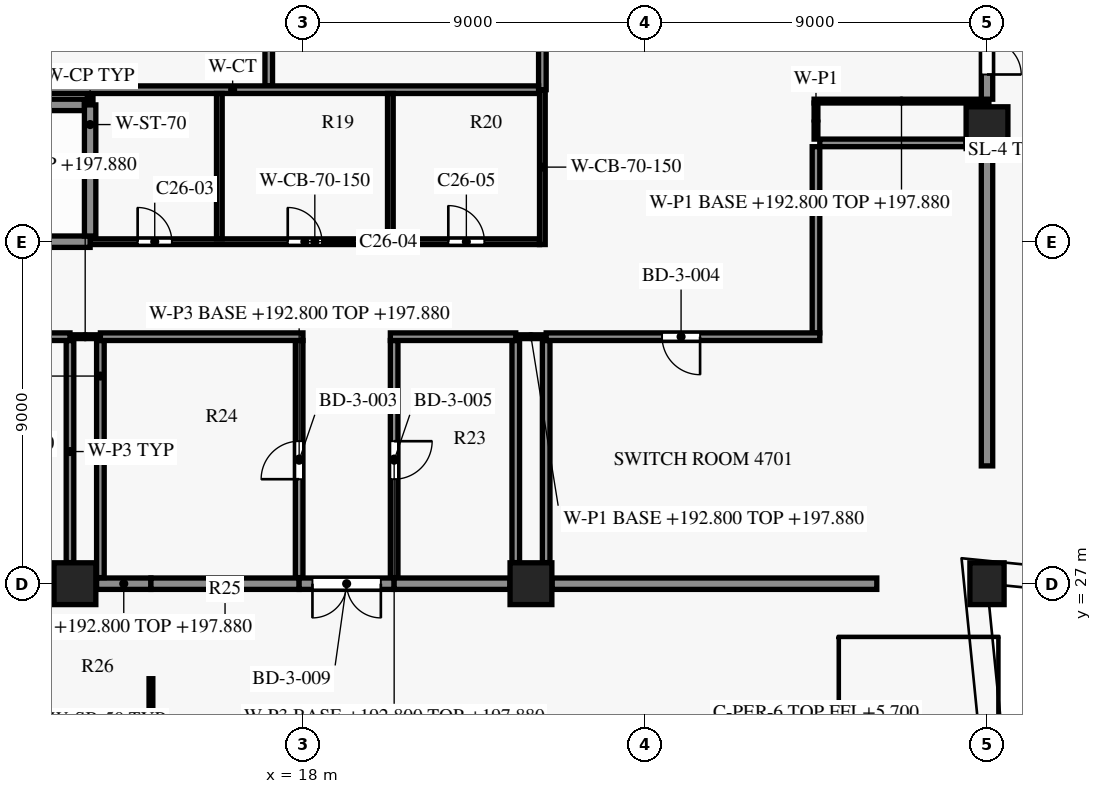
"""IFC4 building model, lengths in metres.
Left out: names, types, materials, properties, quantities, classifications, styles, units other than length and angle.
Written with IfcOpenShell. Run it as: python <this file> out.ifc"""

import sys

from ifc_helpers import new_model, si_unit, direction, frame, frame_2d, origin, origin_2d, place, context, subcontext, project, spatial, rectangle, extrude, element, fill, save


model = new_model("IFC4")
c1 = context("Model", 3, precision=1e-05, world=origin(), true_north=direction((0.0, 1.0)))
c2 = subcontext(c1, "Body", "Model", "MODEL_VIEW")
j1 = project(units=[si_unit("LENGTHUNIT", "METRE"), si_unit("PLANEANGLEUNIT", "RADIAN")], contexts=[c1])
p1 = place(None, origin())
s1 = spatial("IfcSite", under=j1, at=p1, CompositionType="ELEMENT")
p2 = place(p1, origin())
s2 = spatial("IfcBuilding", under=s1, at=p2, CompositionType="ELEMENT")
p3 = place(p2, frame((0.0, 0.0, 192.8)))
s3 = spatial("IfcBuildingStorey", under=s2, at=p3, CompositionType="ELEMENT", Elevation=192.8)
p4 = place(p3, frame((36.0, 27.0, 0.0), z_axis=(0.0, 0.0, 1.0), x_axis=(-0.0995038382, 0.995037178292, 0.0)))
e1 = element("IfcColumn", 1, at=p4, inside=s3, PredefinedType="COLUMN", context=c2, shape_type="SweptSolid", body=[
    extrude(rectangle(XDim=0.9, YDim=1.1, at=origin_2d()), origin(), (0.0, 0.0, 1.0), 6.0),
])
for number, where, z_axis, x_axis in (
    (2, (12.0, 27.0, 0.0), (0.0, 0.0, 1.0), (1.0, 0.0, 0.0)),
    (3, (24.0, 27.0, 0.0), (0.0, 0.0, 1.0), (1.0, 0.0, 0.0)),
    (4, (36.0, 39.0, 0.0), (0.0, 0.0, 1.0), (1.0, 0.0, 0.0)),
):
    element("IfcColumn", number, at=place(p3, frame(where, z_axis=z_axis, x_axis=x_axis)), inside=s3, PredefinedType="COLUMN", context=c2, shape_type="SweptSolid", body=[
        extrude(rectangle(XDim=1.1, YDim=1.1, at=origin_2d()), origin(), (0.0, 0.0, 1.0), 6.0),
    ])
p5 = place(p3, frame((12.4, 36.0, 0.0), z_axis=(0.0, 0.0, 1.0), x_axis=(1.0, 0.0, 0.0)))
e5 = element("IfcWall", 5, at=p5, inside=s3, PredefinedType="SHEAR", context=c2, shape_type="SweptSolid", body=[
    extrude(rectangle(XDim=11.825, YDim=0.15, at=frame_2d((5.913, 0.0))), origin(), (0.0, 0.0, 1.0), 5.7),
])
p6 = place(p5, frame((1.25, 0.0, 0.0)))
e6 = element("IfcOpeningElement", 6, at=p6, cuts=e5, PredefinedType="OPENING", context=c2, shape_type="SweptSolid", body=[
    extrude(rectangle(XDim=0.9, YDim=2.1, at=frame_2d((0.45, 1.05))), frame((0.0, 0.085, 0.0), z_axis=(0.0, -1.0, 0.0), x_axis=(1.0, 0.0, 0.0)), (0.0, 0.0, 1.0), 0.17),
])
p7 = place(p5, frame((5.2, 0.0, 0.0)))
e7 = element("IfcOpeningElement", 7, at=p7, cuts=e5, PredefinedType="OPENING", context=c2, shape_type="SweptSolid", body=[
    extrude(rectangle(XDim=0.9, YDim=2.1, at=frame_2d((0.45, 1.05))), frame((0.0, 0.085, 0.0), z_axis=(0.0, -1.0, 0.0), x_axis=(1.0, 0.0, 0.0)), (0.0, 0.0, 1.0), 0.17),
])
p8 = place(p5, frame((9.425, 0.0, 0.0)))
e8 = element("IfcOpeningElement", 8, at=p8, cuts=e5, PredefinedType="OPENING", context=c2, shape_type="SweptSolid", body=[
    extrude(rectangle(XDim=0.95, YDim=2.1, at=frame_2d((0.475, 1.05))), frame((0.0, 0.085, 0.0), z_axis=(0.0, -1.0, 0.0), x_axis=(1.0, 0.0, 0.0)), (0.0, 0.0, 1.0), 0.17),
])
p9 = place(p3, frame((4.55, 36.0, 0.0), z_axis=(0.0, 0.0, 1.0), x_axis=(1.0, 0.0, 0.0)))
e9 = element("IfcWall", 9, at=p9, inside=s3, PredefinedType="SHEAR", context=c2, shape_type="SweptSolid", body=[
    extrude(rectangle(XDim=7.85, YDim=0.3, at=frame_2d((3.925, 0.0))), origin(), (0.0, 0.0, 1.0), 5.7),
])
p10 = place(p9, frame((0.15, 0.0, 0.0)))
e10 = element("IfcOpeningElement", 10, at=p10, cuts=e9, PredefinedType="OPENING", context=c2, shape_type="SweptSolid", body=[
    extrude(rectangle(XDim=1.5, YDim=2.2, at=frame_2d((0.75, 1.1))), frame((0.0, 0.16, 0.0), z_axis=(0.0, -1.0, 0.0), x_axis=(1.0, 0.0, 0.0)), (0.0, 0.0, 1.0), 0.32),
])
p11 = place(p3, frame((4.55, 39.6, 0.0), z_axis=(0.0, 0.0, 1.0), x_axis=(1.0, 0.0, 0.0)))
e11 = element("IfcWall", 11, at=p11, inside=s3, PredefinedType="SHEAR", context=c2, shape_type="SweptSolid", body=[
    extrude(rectangle(XDim=7.7, YDim=0.3, at=frame_2d((3.85, 0.0))), origin(), (0.0, 0.0, 1.0), 5.7),
])
p12 = place(p3, frame((8.1, 40.0, 0.0), z_axis=(0.0, 0.0, 1.0), x_axis=(1.0, 0.0, 0.0)))
e12 = element("IfcWall", 12, at=p12, inside=s3, PredefinedType="PARTITIONING", context=c2, shape_type="SweptSolid", body=[
    extrude(rectangle(XDim=16.1, YDim=0.2, at=frame_2d((8.05, 0.0))), origin(), (0.0, 0.0, 1.0), 5.7),
])
p13 = place(p3, frame((12.4, 39.6, 0.0), z_axis=(0.0, 0.0, 1.0), x_axis=(0.0, 1.0, 0.0)))
e13 = element("IfcWall", 13, at=p13, inside=s3, PredefinedType="PARTITIONING", context=c2, shape_type="SweptSolid", body=[
    extrude(rectangle(XDim=0.3, YDim=0.15, at=frame_2d((0.15, 0.0))), origin(), (0.0, 0.0, 1.0), 5.7),
])
p14 = place(p3, frame((12.4, 36.15, 0.0), z_axis=(0.0, 0.0, 1.0), x_axis=(0.0, 1.0, 0.0)))
e14 = element("IfcWall", 14, at=p14, inside=s3, PredefinedType="SHEAR", context=c2, shape_type="SweptSolid", body=[
    extrude(rectangle(XDim=3.45, YDim=0.3, at=frame_2d((1.725, 0.0))), origin(), (0.0, 0.0, 1.0), 5.7),
])
p15 = place(p3, frame((15.8, 36.075, 0.0), z_axis=(0.0, 0.0, 1.0), x_axis=(0.0, 1.0, 0.0)))
e15 = element("IfcWall", 15, at=p15, inside=s3, PredefinedType="PARTITIONING", context=c2, shape_type="SweptSolid", body=[
    extrude(rectangle(XDim=3.825, YDim=0.15, at=frame_2d((1.913, 0.0))), origin(), (0.0, 0.0, 1.0), 5.7),
])
p16 = place(p3, frame((17.1, 40.1, 0.0), z_axis=(0.0, 0.0, 1.0), x_axis=(0.0, 1.0, 0.0)))
e16 = element("IfcWall", 16, at=p16, inside=s3, PredefinedType="PARTITIONING", context=c2, shape_type="SweptSolid", body=[
    extrude(rectangle(XDim=3.0, YDim=0.2, at=frame_2d((1.5, 0.0))), origin(), (0.0, 0.0, 1.0), 5.7),
])
p17 = place(p3, frame((20.3, 36.075, 0.0), z_axis=(0.0, 0.0, 1.0), x_axis=(0.0, 1.0, 0.0)))
e17 = element("IfcWall", 17, at=p17, inside=s3, PredefinedType="PARTITIONING", context=c2, shape_type="SweptSolid", body=[
    extrude(rectangle(XDim=3.825, YDim=0.15, at=frame_2d((1.913, 0.0))), origin(), (0.0, 0.0, 1.0), 5.7),
])
p18 = place(p3, frame((24.3, 35.925, 0.0), z_axis=(0.0, 0.0, 1.0), x_axis=(0.0, 1.0, 0.0)))
e18 = element("IfcWall", 18, at=p18, inside=s3, PredefinedType="SHEAR", context=c2, shape_type="SweptSolid", body=[
    extrude(rectangle(XDim=4.075, YDim=0.15, at=frame_2d((2.038, 0.0))), origin(), (0.0, 0.0, 1.0), 5.7),
])
p19 = place(p3, frame((24.3, 40.0, 0.0), z_axis=(0.0, 0.0, 1.0), x_axis=(0.0, 1.0, 0.0)))
e19 = element("IfcWall", 19, at=p19, inside=s3, PredefinedType="PARTITIONING", context=c2, shape_type="SweptSolid", body=[
    extrude(rectangle(XDim=3.3, YDim=0.2, at=frame_2d((1.65, 0.0))), origin(), (0.0, 0.0, 1.0), 5.7),
])
p20 = place(p3, frame((14.0, 24.5, 0.0), z_axis=(0.0, 0.0, 1.0), x_axis=(0.0, -1.0, 0.0)))
e20 = element("IfcWall", 20, at=p20, inside=s3, PredefinedType="PARTITIONING", context=c2, shape_type="SweptSolid", body=[
    extrude(rectangle(XDim=6.3, YDim=0.1, at=frame_2d((3.15, 0.0))), origin(), (0.0, 0.0, 1.0), 5.68),
])
p21 = place(p3, frame((10.9, 27.0, 0.0), z_axis=(0.0, 0.0, 1.0), x_axis=(1.0, 0.0, 0.0)))
e21 = element("IfcWall", 21, at=p21, inside=s3, PredefinedType="PARTITIONING", context=c2, shape_type="SweptSolid", body=[
    extrude(rectangle(XDim=0.545, YDim=0.3, at=frame_2d((0.272, 0.0))), origin(), (0.0, 0.0, 1.0), 5.68),
])
p22 = place(p3, frame((12.57, 27.0, 0.0), z_axis=(0.0, 0.0, 1.0), x_axis=(1.0, 0.0, 0.0)))
e22 = element("IfcWall", 22, at=p22, inside=s3, PredefinedType="PARTITIONING", context=c2, shape_type="SweptSolid", body=[
    extrude(rectangle(XDim=1.43, YDim=0.3, at=frame_2d((0.715, 0.0))), origin(), (0.0, 0.0, 1.0), 5.08),
])
p23 = place(p3, frame((17.9, 27.0, 0.0), z_axis=(0.0, 0.0, 1.0), x_axis=(-1.0, 0.0, 0.0)))
e23 = element("IfcWall", 23, at=p23, inside=s3, PredefinedType="PARTITIONING", context=c2, shape_type="SweptSolid", body=[
    extrude(rectangle(XDim=3.9, YDim=0.3, at=frame_2d((1.95, 0.0))), origin(), (0.0, 0.0, 1.0), 5.08),
])
p24 = place(p3, frame((20.4, 27.0, 0.0), z_axis=(0.0, 0.0, 1.0), x_axis=(-1.0, 0.0, 0.0)))
e24 = element("IfcWall", 24, at=p24, inside=s3, PredefinedType="PARTITIONING", context=c2, shape_type="SweptSolid", body=[
    extrude(rectangle(XDim=2.5, YDim=0.3, at=frame_2d((1.25, 0.0))), origin(), (0.0, 0.0, 1.0), 5.08),
])
p25 = place(p24, frame((0.35, 0.0, 0.0)))
e25 = element("IfcOpeningElement", 25, at=p25, cuts=e24, PredefinedType="OPENING", context=c2, shape_type="SweptSolid", body=[
    extrude(rectangle(XDim=1.8, YDim=2.1, at=frame_2d((0.9, 1.05))), frame((0.0, 0.16, 0.0), z_axis=(0.0, -1.0, 0.0), x_axis=(1.0, 0.0, 0.0)), (0.0, 0.0, 1.0), 0.32),
])
p26 = place(p3, frame((23.445, 27.0, 0.0), z_axis=(0.0, 0.0, 1.0), x_axis=(-1.0, 0.0, 0.0)))
e26 = element("IfcWall", 26, at=p26, inside=s3, PredefinedType="PARTITIONING", context=c2, shape_type="SweptSolid", body=[
    extrude(rectangle(XDim=3.045, YDim=0.3, at=frame_2d((1.522, 0.0))), origin(), (0.0, 0.0, 1.0), 5.08),
])
p27 = place(p3, frame((33.1, 27.0, 0.0), z_axis=(0.0, 0.0, 1.0), x_axis=(-1.0, 0.0, 0.0)))
e27 = element("IfcWall", 27, at=p27, inside=s3, PredefinedType="PARTITIONING", context=c2, shape_type="SweptSolid", body=[
    extrude(rectangle(XDim=8.545, YDim=0.3, at=frame_2d((4.272, 0.0))), origin(), (0.0, 0.0, 1.0), 5.08),
])
p28 = place(p3, frame((12.67, 27.16, 0.0), z_axis=(0.0, 0.0, 1.0), x_axis=(0.0, 1.0, 0.0)))
e28 = element("IfcWall", 28, at=p28, inside=s3, PredefinedType="PARTITIONING", context=c2, shape_type="SweptSolid", body=[
    extrude(rectangle(XDim=6.24, YDim=0.2, at=frame_2d((3.12, 0.0))), origin(), (0.0, 0.0, 1.0), 5.08),
])
p29 = place(p3, frame((17.9, 27.16, 0.0), z_axis=(0.0, 0.0, 1.0), x_axis=(0.0, 1.0, 0.0)))
e29 = element("IfcWall", 29, at=p29, inside=s3, PredefinedType="PARTITIONING", context=c2, shape_type="SweptSolid", body=[
    extrude(rectangle(XDim=6.24, YDim=0.2, at=frame_2d((3.12, 0.0))), origin(), (0.0, 0.0, 1.0), 5.08),
])
p30 = place(p29, frame((2.59, 0.0, 0.0)))
e30 = element("IfcOpeningElement", 30, at=p30, cuts=e29, PredefinedType="OPENING", context=c2, shape_type="SweptSolid", body=[
    extrude(rectangle(XDim=1.0, YDim=2.1, at=frame_2d((0.5, 1.05))), frame((0.0, 0.11, 0.0), z_axis=(0.0, -1.0, 0.0), x_axis=(1.0, 0.0, 0.0)), (0.0, 0.0, 1.0), 0.22),
])
for number, where, z_axis, x_axis in (
    (31, (24.4, 27.555, 0.0), (0.0, 0.0, 1.0), (0.0, 1.0, 0.0)),
    (32, (11.87, 33.4, 0.0), (0.0, 0.0, 1.0), (0.0, -1.0, 0.0)),
):
    element("IfcWall", number, at=place(p3, frame(where, z_axis=z_axis, x_axis=x_axis)), inside=s3, PredefinedType="PARTITIONING", context=c2, shape_type="SweptSolid", body=[
        extrude(rectangle(XDim=5.845, YDim=0.2, at=frame_2d((2.922, 0.0))), origin(), (0.0, 0.0, 1.0), 5.68),
    ])
p31 = place(p3, frame((20.4, 33.4, 0.0), z_axis=(0.0, 0.0, 1.0), x_axis=(0.0, -1.0, 0.0)))
e33 = element("IfcWall", 33, at=p31, inside=s3, PredefinedType="PARTITIONING", context=c2, shape_type="SweptSolid", body=[
    extrude(rectangle(XDim=6.24, YDim=0.2, at=frame_2d((3.12, 0.0))), origin(), (0.0, 0.0, 1.0), 5.08),
])
p32 = place(p31, frame((2.65, 0.0, 0.0)))
e34 = element("IfcOpeningElement", 34, at=p32, cuts=e33, PredefinedType="OPENING", context=c2, shape_type="SweptSolid", body=[
    extrude(rectangle(XDim=1.0, YDim=2.1, at=frame_2d((0.5, 1.05))), frame((0.0, 0.11, 0.0), z_axis=(0.0, -1.0, 0.0), x_axis=(1.0, 0.0, 0.0)), (0.0, 0.0, 1.0), 0.22),
])
p33 = place(p3, frame((23.6, 33.4, 0.0), z_axis=(0.0, 0.0, 1.0), x_axis=(0.0, -1.0, 0.0)))
e35 = element("IfcWall", 35, at=p33, inside=s3, PredefinedType="PARTITIONING", context=c2, shape_type="SweptSolid", body=[
    extrude(rectangle(XDim=5.845, YDim=0.2, at=frame_2d((2.922, 0.0))), origin(), (0.0, 0.0, 1.0), 5.68),
])
p34 = place(p3, frame((11.87, 33.5, 0.0), z_axis=(0.0, 0.0, 1.0), x_axis=(-1.0, 0.0, 0.0)))
e36 = element("IfcWall", 36, at=p34, inside=s3, PredefinedType="PARTITIONING", context=c2, shape_type="SweptSolid", body=[
    extrude(rectangle(XDim=5.47, YDim=0.2, at=frame_2d((2.735, 0.0))), origin(), (0.0, 0.0, 1.0), 5.68),
])
p35 = place(p34, frame((2.295, 0.0, 0.0)))
e37 = element("IfcOpeningElement", 37, at=p35, cuts=e36, PredefinedType="OPENING", context=c2, shape_type="SweptSolid", body=[
    extrude(rectangle(XDim=1.0, YDim=2.1, at=frame_2d((0.5, 1.05))), frame((0.0, 0.11, 0.0), z_axis=(0.0, -1.0, 0.0), x_axis=(1.0, 0.0, 0.0)), (0.0, 0.0, 1.0), 0.22),
])
p36 = place(p3, frame((12.67, 33.5, 0.0), z_axis=(0.0, 0.0, 1.0), x_axis=(-1.0, 0.0, 0.0)))
e38 = element("IfcWall", 38, at=p36, inside=s3, PredefinedType="PARTITIONING", context=c2, shape_type="SweptSolid", body=[
    extrude(rectangle(XDim=0.8, YDim=0.1, at=frame_2d((0.4, 0.0))), origin(), (0.0, 0.0, 1.0), 5.08),
])
p37 = place(p3, frame((18.0, 33.5, 0.0), z_axis=(0.0, 0.0, 1.0), x_axis=(-1.0, 0.0, 0.0)))
e39 = element("IfcWall", 39, at=p37, inside=s3, PredefinedType="PARTITIONING", context=c2, shape_type="SweptSolid", body=[
    extrude(rectangle(XDim=5.33, YDim=0.2, at=frame_2d((2.665, 0.0))), origin(), (0.0, 0.0, 1.0), 5.68),
])
p38 = place(p3, frame((23.6, 33.5, 0.0), z_axis=(0.0, 0.0, 1.0), x_axis=(-1.0, 0.0, 0.0)))
e40 = element("IfcWall", 40, at=p38, inside=s3, PredefinedType="PARTITIONING", context=c2, shape_type="SweptSolid", body=[
    extrude(rectangle(XDim=3.3, YDim=0.2, at=frame_2d((1.65, 0.0))), origin(), (0.0, 0.0, 1.0), 5.68),
])
p39 = place(p3, frame((24.4, 33.5, 0.0), z_axis=(0.0, 0.0, 1.0), x_axis=(-1.0, 0.0, 0.0)))
e41 = element("IfcWall", 41, at=p39, inside=s3, PredefinedType="PARTITIONING", context=c2, shape_type="SweptSolid", body=[
    extrude(rectangle(XDim=0.8, YDim=0.1, at=frame_2d((0.4, 0.0))), origin(), (0.0, 0.0, 1.0), 5.08),
])
p40 = place(p3, frame((31.6, 33.5, 0.0), z_axis=(0.0, 0.0, 1.0), x_axis=(-1.0, 0.0, 0.0)))
e42 = element("IfcWall", 42, at=p40, inside=s3, PredefinedType="PARTITIONING", context=c2, shape_type="SweptSolid", body=[
    extrude(rectangle(XDim=7.2, YDim=0.2, at=frame_2d((3.6, 0.0))), origin(), (0.0, 0.0, 1.0), 5.68),
])
p41 = place(p40, frame((3.15, 0.0, 0.0)))
e43 = element("IfcOpeningElement", 43, at=p41, cuts=e42, PredefinedType="OPENING", context=c2, shape_type="SweptSolid", body=[
    extrude(rectangle(XDim=1.0, YDim=2.1, at=frame_2d((0.5, 1.05))), frame((0.0, 0.11, 0.0), z_axis=(0.0, -1.0, 0.0), x_axis=(1.0, 0.0, 0.0)), (0.0, 0.0, 1.0), 0.22),
])
p42 = place(p3, frame((36.0, 38.445, 0.0), z_axis=(0.0, 0.0, 1.0), x_axis=(0.0, -1.0, 0.0)))
e44 = element("IfcWall", 44, at=p42, inside=s3, PredefinedType="PARTITIONING", context=c2, shape_type="SweptSolid", body=[
    extrude(rectangle(XDim=8.345, YDim=0.3, at=frame_2d((4.172, 0.0))), origin(), (0.0, 0.0, 1.0), 5.08),
])
p43 = place(p3, frame((31.5, 38.5, 0.0), z_axis=(0.0, 0.0, 1.0), x_axis=(0.0, -1.0, 0.0)))
e45 = element("IfcWall", 45, at=p43, inside=s3, PredefinedType="PARTITIONING", context=c2, shape_type="SweptSolid", body=[
    extrude(rectangle(XDim=4.9, YDim=0.2, at=frame_2d((2.45, 0.0))), origin(), (0.0, 0.0, 1.0), 5.68),
])
p44 = place(p3, frame((31.6, 38.6, 0.0), z_axis=(0.0, 0.0, 1.0), x_axis=(1.0, 0.0, 0.0)))
e46 = element("IfcWall", 46, at=p44, inside=s3, PredefinedType="PARTITIONING", context=c2, shape_type="SweptSolid", body=[
    extrude(rectangle(XDim=3.845, YDim=0.2, at=frame_2d((1.922, 0.0))), origin(), (0.0, 0.0, 1.0), 5.68),
])
p45 = place(p3, frame((31.5, 39.65, 0.0), z_axis=(0.0, 0.0, 1.0), x_axis=(0.0, -1.0, 0.0)))
e47 = element("IfcWall", 47, at=p45, inside=s3, PredefinedType="PARTITIONING", context=c2, shape_type="SweptSolid", body=[
    extrude(rectangle(XDim=0.95, YDim=0.1, at=frame_2d((0.475, 0.0))), origin(), (0.0, 0.0, 1.0), 5.68),
])
p46 = place(p3, frame((36.05, 39.7, 0.0), z_axis=(0.0, 0.0, 1.0), x_axis=(-1.0, 0.0, 0.0)))
e48 = element("IfcWall", 48, at=p46, inside=s3, PredefinedType="PARTITIONING", context=c2, shape_type="SweptSolid", body=[
    extrude(rectangle(XDim=4.6, YDim=0.1, at=frame_2d((2.3, 0.0))), origin(), (0.0, 0.0, 1.0), 5.08),
])
p47 = place(p3, frame((36.0, 42.8, 0.0), z_axis=(0.0, 0.0, 1.0), x_axis=(0.0, -1.0, 0.0)))
e49 = element("IfcWall", 49, at=p47, inside=s3, PredefinedType="PARTITIONING", context=c2, shape_type="SweptSolid", body=[
    extrude(rectangle(XDim=3.05, YDim=0.3, at=frame_2d((1.525, 0.0))), origin(), (0.0, 0.0, 1.0), 5.08),
])
p48 = place(p47, frame((0.6, 0.0, 0.0)))
e50 = element("IfcOpeningElement", 50, at=p48, cuts=e49, PredefinedType="OPENING", context=c2, shape_type="SweptSolid", body=[
    extrude(rectangle(XDim=1.8, YDim=2.1, at=frame_2d((0.9, 1.05))), frame((0.0, 0.16, 0.0), z_axis=(0.0, -1.0, 0.0), x_axis=(1.0, 0.0, 0.0)), (0.0, 0.0, 1.0), 0.32),
])
p49 = place(p6, origin())
e51 = element("IfcDoor", 51, at=p49, inside=s3, OperationType="SINGLE_SWING_RIGHT", PredefinedType="DOOR", context=c2, shape_type="SweptSolid", body=[
    extrude(rectangle(XDim=0.9, YDim=2.1, at=frame_2d((0.45, 1.05))), frame((0.0, 0.025, 0.0), z_axis=(0.0, -1.0, 0.0), x_axis=(1.0, 0.0, 0.0)), (0.0, 0.0, 1.0), 0.05),
])
fill(e6, e51)
p50 = place(p7, origin())
e52 = element("IfcDoor", 52, at=p50, inside=s3, OperationType="SINGLE_SWING_LEFT", PredefinedType="DOOR", context=c2, shape_type="SweptSolid", body=[
    extrude(rectangle(XDim=0.9, YDim=2.1, at=frame_2d((0.45, 1.05))), frame((0.0, 0.025, 0.0), z_axis=(0.0, -1.0, 0.0), x_axis=(1.0, 0.0, 0.0)), (0.0, 0.0, 1.0), 0.05),
])
fill(e7, e52)
p51 = place(p8, origin())
e53 = element("IfcDoor", 53, at=p51, inside=s3, OperationType="SINGLE_SWING_RIGHT", PredefinedType="DOOR", context=c2, shape_type="SweptSolid", body=[
    extrude(rectangle(XDim=0.95, YDim=2.1, at=frame_2d((0.475, 1.05))), frame((0.0, 0.025, 0.0), z_axis=(0.0, -1.0, 0.0), x_axis=(1.0, 0.0, 0.0)), (0.0, 0.0, 1.0), 0.05),
])
fill(e8, e53)
p52 = place(p30, origin())
e54 = element("IfcDoor", 54, at=p52, inside=s3, OperationType="SINGLE_SWING_RIGHT", PredefinedType="DOOR", context=c2, shape_type="SweptSolid", body=[
    extrude(rectangle(XDim=1.0, YDim=2.1, at=frame_2d((0.5, 1.05))), frame((0.0, 0.025, 0.0), z_axis=(0.0, -1.0, 0.0), x_axis=(1.0, 0.0, 0.0)), (0.0, 0.0, 1.0), 0.05),
])
fill(e30, e54)
p53 = place(p41, origin())
e55 = element("IfcDoor", 55, at=p53, inside=s3, OperationType="SINGLE_SWING_RIGHT", PredefinedType="DOOR", context=c2, shape_type="SweptSolid", body=[
    extrude(rectangle(XDim=1.0, YDim=2.1, at=frame_2d((0.5, 1.05))), frame((0.0, 0.025, 0.0), z_axis=(0.0, -1.0, 0.0), x_axis=(1.0, 0.0, 0.0)), (0.0, 0.0, 1.0), 0.05),
])
fill(e43, e55)
p54 = place(p32, origin())
e56 = element("IfcDoor", 56, at=p54, inside=s3, OperationType="SINGLE_SWING_LEFT", PredefinedType="DOOR", context=c2, shape_type="SweptSolid", body=[
    extrude(rectangle(XDim=1.0, YDim=2.1, at=frame_2d((0.5, 1.05))), frame((0.0, 0.025, 0.0), z_axis=(0.0, -1.0, 0.0), x_axis=(1.0, 0.0, 0.0)), (0.0, 0.0, 1.0), 0.05),
])
fill(e34, e56)
p55 = place(p48, origin())
e57 = element("IfcDoor", 57, at=p55, inside=s3, OperationType="DOUBLE_DOOR_SINGLE_SWING", PredefinedType="DOOR", context=c2, shape_type="SweptSolid", body=[
    extrude(rectangle(XDim=1.8, YDim=2.1, at=frame_2d((0.9, 1.05))), frame((0.0, 0.025, 0.0), z_axis=(0.0, -1.0, 0.0), x_axis=(1.0, 0.0, 0.0)), (0.0, 0.0, 1.0), 0.05),
])
fill(e50, e57)
p56 = place(p25, origin())
e58 = element("IfcDoor", 58, at=p56, inside=s3, OperationType="DOUBLE_DOOR_SINGLE_SWING", PredefinedType="DOOR", context=c2, shape_type="SweptSolid", body=[
    extrude(rectangle(XDim=1.8, YDim=2.1, at=frame_2d((0.9, 1.05))), frame((0.0, 0.025, 0.0), z_axis=(0.0, -1.0, 0.0), x_axis=(1.0, 0.0, 0.0)), (0.0, 0.0, 1.0), 0.05),
])
fill(e25, e58)
save(model, sys.argv[1])
